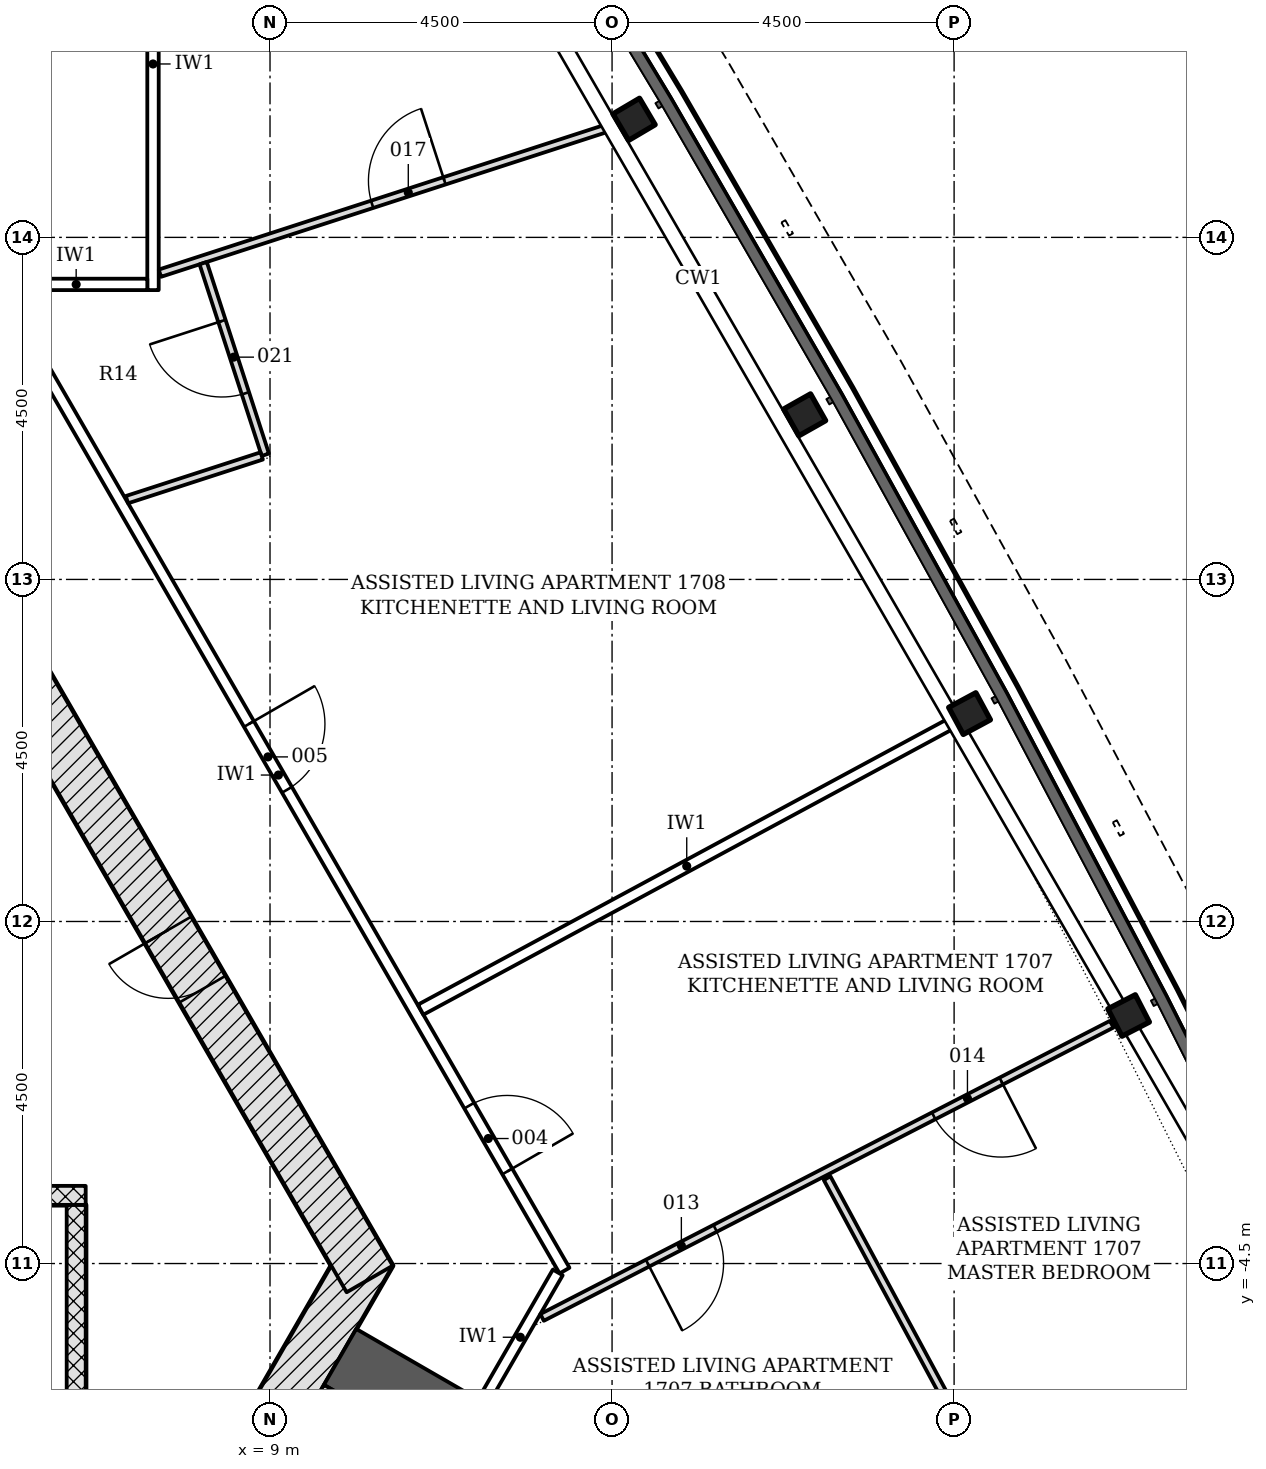
"""IFC4 building model, lengths in metres.
Left out: names, types, materials, properties, quantities, classifications, styles, units other than length and angle.
Written with IfcOpenShell. Run it as: python <this file> out.ifc"""

import sys

from ifc_helpers import new_model, si_unit, direction, frame, frame_2d, origin, origin_2d, place, context, subcontext, project, spatial, rectangle, i_section, extrude, element, fill, save


model = new_model("IFC4")
c1 = context("Model", 3, precision=1e-05, world=origin(), true_north=direction((0.0, 1.0)))
c2 = subcontext(c1, "Body", "Model", "MODEL_VIEW")
j1 = project(units=[si_unit("LENGTHUNIT", "METRE"), si_unit("PLANEANGLEUNIT", "RADIAN")], contexts=[c1])
p1 = place(None, origin())
s1 = spatial("IfcSite", under=j1, at=p1, CompositionType="ELEMENT")
p2 = place(p1, origin())
s2 = spatial("IfcBuilding", under=s1, at=p2, CompositionType="ELEMENT")
p3 = place(p2, frame((0.0, 0.0, 69.0)))
s3 = spatial("IfcBuildingStorey", under=s2, at=p3, CompositionType="ELEMENT", Elevation=69.0)
p4 = place(p3, frame((8.926, -6.753, -0.2), z_axis=(0.0, 0.0, 1.0), x_axis=(0.500042739161, 0.866000726912, 0.0)))
e1 = element("IfcWall", 1, at=p4, inside=s3, PredefinedType="SHEAR", context=c2, shape_type="SweptSolid", body=[
    extrude(rectangle(XDim=2.771, YDim=0.7, at=frame_2d((1.386, 0.0))), origin(), (0.0, 0.0, 1.0), 3.6),
])
p5 = place(p3, frame((10.311, -4.703, -0.2), z_axis=(0.0, 0.0, 1.0), x_axis=(-0.500001446645, 0.866024568562, 0.0)))
e2 = element("IfcWall", 2, at=p5, inside=s3, PredefinedType="SHEAR", context=c2, shape_type="SweptSolid", body=[
    extrude(rectangle(XDim=18.458, YDim=0.7, at=frame_2d((9.229, 0.0))), origin(), (0.0, 0.0, 1.0), 3.6),
])
p6 = place(p5, frame((9.5, 0.0, 0.2)))
e3 = element("IfcOpeningElement", 3, at=p6, cuts=e2, PredefinedType="OPENING", context=c2, shape_type="SweptSolid", body=[
    extrude(rectangle(XDim=1.0, YDim=2.1, at=frame_2d((0.5, 1.05))), frame((0.0, 0.36, 0.0), z_axis=(0.0, -1.0, 0.0), x_axis=(1.0, 0.0, 0.0)), (0.0, 0.0, 1.0), 0.72),
])
p7 = place(p5, frame((4.402, 0.0, 0.2)))
e4 = element("IfcOpeningElement", 4, at=p7, cuts=e2, PredefinedType="OPENING", context=c2, shape_type="SweptSolid", body=[
    extrude(rectangle(XDim=0.9, YDim=2.1, at=frame_2d((0.45, 1.05))), frame((0.0, 0.36, 0.0), z_axis=(0.0, -1.0, 0.0), x_axis=(1.0, 0.0, 0.0)), (0.0, 0.0, 1.0), 0.72),
])
p8 = place(p5, frame((13.927, 0.0, 0.2)))
e5 = element("IfcOpeningElement", 5, at=p8, cuts=e2, PredefinedType="OPENING", context=c2, shape_type="SweptSolid", body=[
    extrude(rectangle(XDim=0.9, YDim=2.1, at=frame_2d((0.45, 1.05))), frame((0.0, 0.36, 0.0), z_axis=(0.0, -1.0, 0.0), x_axis=(1.0, 0.0, 0.0)), (0.0, 0.0, 1.0), 0.72),
])
p9 = place(p3, frame((9.922, -5.728, -0.2), z_axis=(0.0, 0.0, 1.0), x_axis=(0.866026077102, -0.499998833779, 0.0)))
e6 = element("IfcWall", 6, at=p9, inside=s3, PredefinedType="SHEAR", context=c2, shape_type="SweptSolid", body=[
    extrude(rectangle(XDim=13.381, YDim=0.85, at=frame_2d((6.691, 0.0))), origin(), (0.0, 0.0, 1.0), 3.6),
])
for number, where, z_axis, x_axis in (
    (7, (20.296, -1.237, -0.2), (0.0, 0.0, 1.0), (-0.458, 0.889, 0.0)),
    (8, (18.203, 2.735, -0.2), (0.0, 0.0, 1.0), (-0.475, 0.88, 0.0)),
    (9, (16.034, 6.665, -0.2), (0.0, 0.0, 1.0), (-0.492, 0.871, 0.0)),
    (10, (13.789, 10.553, -0.2), (0.0, 0.0, 1.0), (-0.508, 0.861, 0.0)),
):
    element("IfcColumn", number, at=place(p3, frame(where, z_axis=z_axis, x_axis=x_axis)), inside=s3, PredefinedType="COLUMN", context=c2, shape_type="SweptSolid", body=[
        extrude(i_section(OverallWidth=0.404, OverallDepth=0.406, WebThickness=0.027, FlangeThickness=0.044, FilletRadius=0.015, at=origin_2d()), origin(), (0.0, 0.0, 1.0), 3.6),
    ])
p10 = place(p3, frame((6.45, -6.228, -0.2), z_axis=(0.0, 0.0, 1.0), x_axis=(0.0, 1.0, 0.0)))
e11 = element("IfcWall", 11, at=p10, inside=s3, PredefinedType="PARTITIONING", context=c2, shape_type="SweptSolid", body=[
    extrude(rectangle(XDim=2.5, YDim=0.25, at=frame_2d((1.25, 0.0))), origin(), (0.0, 0.0, 1.0), 3.6),
])
p11 = place(p3, frame((-6.575, -3.603, 0.0), z_axis=(0.0, 0.0, 1.0), x_axis=(1.0, 0.0, 0.0)))
e12 = element("IfcWall", 12, at=p11, inside=s3, PredefinedType="PARTITIONING", context=c2, shape_type="SweptSolid", body=[
    extrude(rectangle(XDim=13.15, YDim=0.25, at=frame_2d((6.575, 0.0))), origin(), (0.0, 0.0, 1.0), 3.4),
])
p12 = place(p3, frame((9.419, -6.599, -0.2), z_axis=(0.0, 0.0, 1.0), x_axis=(0.866033125095, -0.499986626058, 0.0)))
e13 = element("IfcWall", 13, at=p12, inside=s3, PredefinedType="SHEAR", context=c2, shape_type="SweptSolid", body=[
    extrude(rectangle(XDim=7.2, YDim=1.161, at=frame_2d((3.6, 0.0))), origin(), (0.0, 0.0, 1.0), 3.6),
])
p13 = place(p3, frame((5.346, 8.446, 0.0), z_axis=(0.0, 0.0, 1.0), x_axis=(0.500008781656, -0.866020333634, 0.0)))
e14 = element("IfcWall", 14, at=p13, inside=s3, PredefinedType="PARTITIONING", context=c2, shape_type="SweptSolid", body=[
    extrude(rectangle(XDim=15.057, YDim=0.15, at=frame_2d((7.528, 0.0))), origin(), (0.0, 0.0, 1.0), 2.778),
])
p14 = place(p13, frame((12.55, 0.0, 0.0)))
e15 = element("IfcOpeningElement", 15, at=p14, cuts=e14, PredefinedType="OPENING", context=c2, shape_type="SweptSolid", body=[
    extrude(rectangle(XDim=1.0, YDim=2.1, at=frame_2d((0.5, 1.05))), frame((0.0, 0.085, 0.0), z_axis=(0.0, -1.0, 0.0), x_axis=(1.0, 0.0, 0.0)), (0.0, 0.0, 1.0), 0.17),
])
p15 = place(p13, frame((6.753, 0.0, 0.0)))
e16 = element("IfcOpeningElement", 16, at=p15, cuts=e14, PredefinedType="OPENING", context=c2, shape_type="SweptSolid", body=[
    extrude(rectangle(XDim=1.0, YDim=2.1, at=frame_2d((0.5, 1.05))), frame((0.0, 0.085, 0.0), z_axis=(0.0, -1.0, 0.0), x_axis=(1.0, 0.0, 0.0)), (0.0, 0.0, 1.0), 0.17),
])
p16 = place(p3, frame((7.461, 8.306, 0.0), z_axis=(0.0, 0.0, 1.0), x_axis=(0.0, 1.0, 0.0)))
e17 = element("IfcWall", 17, at=p16, inside=s3, PredefinedType="PARTITIONING", context=c2, shape_type="SweptSolid", body=[
    extrude(rectangle(XDim=5.95, YDim=0.15, at=frame_2d((2.975, 0.0))), origin(), (0.0, 0.0, 1.0), 2.778),
])
p17 = place(p3, frame((11.801, -6.323, 0.0), z_axis=(0.0, 0.0, 1.0), x_axis=(0.500058665202, 0.865991530765, 0.0)))
e18 = element("IfcWall", 18, at=p17, inside=s3, PredefinedType="PARTITIONING", context=c2, shape_type="SweptSolid", body=[
    extrude(rectangle(XDim=1.969, YDim=0.15, at=frame_2d((0.985, 0.0))), origin(), (0.0, 0.0, 1.0), 2.778),
])
p18 = place(p3, frame((5.514, 8.381, 0.0), z_axis=(0.0, 0.0, 1.0), x_axis=(1.0, 0.0, 0.0)))
e19 = element("IfcWall", 19, at=p18, inside=s3, PredefinedType="PARTITIONING", context=c2, shape_type="SweptSolid", body=[
    extrude(rectangle(XDim=1.872, YDim=0.15, at=frame_2d((0.936, 0.0))), origin(), (0.0, 0.0, 1.0), 3.4),
])
p19 = place(p3, frame((17.983, 2.616, 0.0), z_axis=(0.0, 0.0, 1.0), x_axis=(-0.880118053528, -0.474754896608, 0.0)))
e20 = element("IfcWall", 20, at=p19, inside=s3, PredefinedType="PARTITIONING", context=c2, shape_type="SweptSolid", body=[
    extrude(rectangle(XDim=7.955, YDim=0.15, at=frame_2d((3.978, 0.0))), origin(), (0.0, 0.0, 1.0), 2.778),
])
p20 = place(p3, frame((20.646, -11.38, 0.0), z_axis=(0.0, 0.0, 1.0), x_axis=(-0.474727306664, 0.880132935588, 0.0)))
e21 = element("IfcWall", 21, at=p20, inside=s3, PredefinedType="PARTITIONING", context=c2, shape_type="SweptSolid", body=[
    extrude(rectangle(XDim=9.094, YDim=0.1, at=frame_2d((4.547, 0.0))), origin(), (0.0, 0.0, 1.0), 2.778),
])
p21 = place(p20, frame((2.222, 0.0, 0.0)))
e22 = element("IfcOpeningElement", 22, at=p21, cuts=e21, PredefinedType="OPENING", context=c2, shape_type="SweptSolid", body=[
    extrude(rectangle(XDim=1.0, YDim=2.1, at=frame_2d((0.5, 1.05))), frame((0.0, 0.06, 0.0), z_axis=(0.0, -1.0, 0.0), x_axis=(1.0, 0.0, 0.0)), (0.0, 0.0, 1.0), 0.12),
])
p22 = place(p3, frame((20.074, -1.351, 0.0), z_axis=(0.0, 0.0, 1.0), x_axis=(-0.88912315758, -0.457668013582, 0.0)))
e23 = element("IfcWall", 23, at=p22, inside=s3, PredefinedType="PARTITIONING", context=c2, shape_type="SweptSolid", body=[
    extrude(rectangle(XDim=8.429, YDim=0.1, at=frame_2d((4.214, 0.0))), origin(), (0.0, 0.0, 1.0), 2.778),
])
p23 = place(p22, frame((5.868, 0.0, 0.0)))
e24 = element("IfcOpeningElement", 24, at=p23, cuts=e23, PredefinedType="OPENING", context=c2, shape_type="SweptSolid", body=[
    extrude(rectangle(XDim=1.0, YDim=2.1, at=frame_2d((0.5, 1.05))), frame((0.0, 0.06, 0.0), z_axis=(0.0, -1.0, 0.0), x_axis=(1.0, 0.0, 0.0)), (0.0, 0.0, 1.0), 0.12),
])
p24 = place(p22, frame((1.635, 0.0, 0.0)))
e25 = element("IfcOpeningElement", 25, at=p24, cuts=e23, PredefinedType="OPENING", context=c2, shape_type="SweptSolid", body=[
    extrude(rectangle(XDim=1.0, YDim=2.1, at=frame_2d((0.5, 1.05))), frame((0.0, 0.06, 0.0), z_axis=(0.0, -1.0, 0.0), x_axis=(1.0, 0.0, 0.0)), (0.0, 0.0, 1.0), 0.12),
])
p25 = place(p3, frame((7.551, 8.529, 0.0), z_axis=(0.0, 0.0, 1.0), x_axis=(0.951171490306, 0.308662916511, 0.0)))
e26 = element("IfcWall", 26, at=p25, inside=s3, PredefinedType="PARTITIONING", context=c2, shape_type="SweptSolid", body=[
    extrude(rectangle(XDim=6.302, YDim=0.1, at=frame_2d((3.151, 0.0))), origin(), (0.0, 0.0, 1.0), 2.778),
])
p26 = place(p25, frame((2.936, 0.0, 0.0)))
e27 = element("IfcOpeningElement", 27, at=p26, cuts=e26, PredefinedType="OPENING", context=c2, shape_type="SweptSolid", body=[
    extrude(rectangle(XDim=1.0, YDim=2.1, at=frame_2d((0.5, 1.05))), frame((0.0, 0.06, 0.0), z_axis=(0.0, -1.0, 0.0), x_axis=(1.0, 0.0, 0.0)), (0.0, 0.0, 1.0), 0.12),
])
p27 = place(p3, frame((8.938, 6.14, 0.0), z_axis=(0.0, 0.0, 1.0), x_axis=(-0.308644385593, 0.951177503541, 0.0)))
e28 = element("IfcWall", 28, at=p27, inside=s3, PredefinedType="PARTITIONING", context=c2, shape_type="SweptSolid", body=[
    extrude(rectangle(XDim=2.65, YDim=0.1, at=frame_2d((1.325, 0.0))), origin(), (0.0, 0.0, 1.0), 2.778),
])
p28 = place(p27, frame((0.85, 0.0, 0.0)))
e29 = element("IfcOpeningElement", 29, at=p28, cuts=e28, PredefinedType="OPENING", context=c2, shape_type="SweptSolid", body=[
    extrude(rectangle(XDim=1.0, YDim=2.1, at=frame_2d((0.5, 1.05))), frame((0.0, 0.06, 0.0), z_axis=(0.0, -1.0, 0.0), x_axis=(1.0, 0.0, 0.0)), (0.0, 0.0, 1.0), 0.12),
])
p29 = place(p3, frame((7.117, 5.549, 0.0), z_axis=(0.0, 0.0, 1.0), x_axis=(0.951141782181, 0.308754449667, 0.0)))
e30 = element("IfcWall", 30, at=p29, inside=s3, PredefinedType="PARTITIONING", context=c2, shape_type="SweptSolid", body=[
    extrude(rectangle(XDim=1.865, YDim=0.1, at=frame_2d((0.932, 0.0))), origin(), (0.0, 0.0, 1.0), 3.4),
])
p30 = place(p7, origin())
e31 = element("IfcDoor", 31, at=p30, inside=s3, OperationType="SINGLE_SWING_RIGHT", PredefinedType="DOOR", context=c2, shape_type="SweptSolid", body=[
    extrude(rectangle(XDim=0.9, YDim=2.1, at=frame_2d((0.45, 1.05))), frame((0.0, 0.075, 0.0), z_axis=(0.0, -1.0, 0.0), x_axis=(1.0, 0.0, 0.0)), (0.0, 0.0, 1.0), 0.15),
])
fill(e4, e31)
p31 = place(p14, origin())
e32 = element("IfcDoor", 32, at=p31, inside=s3, OperationType="SINGLE_SWING_RIGHT", PredefinedType="DOOR", context=c2, shape_type="SweptSolid", body=[
    extrude(rectangle(XDim=1.0, YDim=2.1, at=frame_2d((0.5, 1.05))), frame((0.0, 0.025, 0.0), z_axis=(0.0, -1.0, 0.0), x_axis=(1.0, 0.0, 0.0)), (0.0, 0.0, 1.0), 0.05),
])
fill(e15, e32)
p32 = place(p15, origin())
e33 = element("IfcDoor", 33, at=p32, inside=s3, OperationType="SINGLE_SWING_LEFT", PredefinedType="DOOR", context=c2, shape_type="SweptSolid", body=[
    extrude(rectangle(XDim=1.0, YDim=2.1, at=frame_2d((0.5, 1.05))), frame((0.0, 0.025, 0.0), z_axis=(0.0, -1.0, 0.0), x_axis=(1.0, 0.0, 0.0)), (0.0, 0.0, 1.0), 0.05),
])
fill(e16, e33)
p33 = place(p23, origin())
e34 = element("IfcDoor", 34, at=p33, inside=s3, OperationType="SINGLE_SWING_RIGHT", PredefinedType="DOOR", context=c2, shape_type="SweptSolid", body=[
    extrude(rectangle(XDim=1.0, YDim=2.1, at=frame_2d((0.5, 1.05))), frame((0.0, 0.025, 0.0), z_axis=(0.0, -1.0, 0.0), x_axis=(1.0, 0.0, 0.0)), (0.0, 0.0, 1.0), 0.05),
])
fill(e24, e34)
p34 = place(p24, origin())
e35 = element("IfcDoor", 35, at=p34, inside=s3, OperationType="SINGLE_SWING_LEFT", PredefinedType="DOOR", context=c2, shape_type="SweptSolid", body=[
    extrude(rectangle(XDim=1.0, YDim=2.1, at=frame_2d((0.5, 1.05))), frame((0.0, 0.025, 0.0), z_axis=(0.0, -1.0, 0.0), x_axis=(1.0, 0.0, 0.0)), (0.0, 0.0, 1.0), 0.05),
])
fill(e25, e35)
p35 = place(p26, origin())
e36 = element("IfcDoor", 36, at=p35, inside=s3, OperationType="SINGLE_SWING_RIGHT", PredefinedType="DOOR", context=c2, shape_type="SweptSolid", body=[
    extrude(rectangle(XDim=1.0, YDim=2.1, at=frame_2d((0.5, 1.05))), frame((0.0, 0.025, 0.0), z_axis=(0.0, -1.0, 0.0), x_axis=(1.0, 0.0, 0.0)), (0.0, 0.0, 1.0), 0.05),
])
fill(e27, e36)
p36 = place(p28, origin())
e37 = element("IfcDoor", 37, at=p36, inside=s3, OperationType="SINGLE_SWING_RIGHT", PredefinedType="DOOR", context=c2, shape_type="SweptSolid", body=[
    extrude(rectangle(XDim=1.0, YDim=2.1, at=frame_2d((0.5, 1.05))), frame((0.0, 0.025, 0.0), z_axis=(0.0, -1.0, 0.0), x_axis=(1.0, 0.0, 0.0)), (0.0, 0.0, 1.0), 0.05),
])
fill(e29, e37)
save(model, sys.argv[1])
